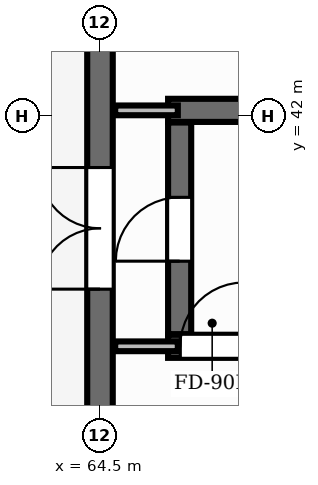
"""IFC4 building model, lengths in metres.
Left out: names, types, materials, properties, quantities, classifications, styles, units other than length and angle.
Written with IfcOpenShell. Run it as: python <this file> out.ifc"""

import sys

from ifc_helpers import new_model, si_unit, direction, frame, frame_2d, origin, place, context, subcontext, project, spatial, rectangle, extrude, element, fill, save


model = new_model("IFC4")
c1 = context("Model", 3, precision=1e-05, world=origin(), true_north=direction((0.0, 1.0)))
c2 = subcontext(c1, "Body", "Model", "MODEL_VIEW")
j1 = project(units=[si_unit("LENGTHUNIT", "METRE"), si_unit("PLANEANGLEUNIT", "RADIAN")], contexts=[c1])
p1 = place(None, origin())
s1 = spatial("IfcSite", under=j1, at=p1, CompositionType="ELEMENT")
p2 = place(p1, origin())
s2 = spatial("IfcBuilding", under=s1, at=p2, CompositionType="ELEMENT")
p3 = place(p2, origin())
s3 = spatial("IfcBuildingStorey", under=s2, at=p3, CompositionType="ELEMENT", Elevation=0.0)
p4 = place(p3, frame((64.5, 7.25, 0.0), z_axis=(0.0, 0.0, 1.0), x_axis=(0.0, 1.0, 0.0)))
e1 = element("IfcWall", 1, at=p4, inside=s3, PredefinedType="SHEAR", context=c2, shape_type="SweptSolid", body=[
    extrude(rectangle(XDim=39.5, YDim=0.42, at=frame_2d((19.75, 0.0))), origin(), (0.0, 0.0, 1.0), 5.1),
])
p5 = place(p4, frame((9.2, 0.0, 0.9)))
e2 = element("IfcOpeningElement", 2, at=p5, cuts=e1, PredefinedType="OPENING", context=c2, shape_type="SweptSolid", body=[
    extrude(rectangle(XDim=1.2, YDim=2.7, at=frame_2d((0.6, 1.35))), frame((0.0, 0.225, 0.0), z_axis=(0.0, -1.0, 0.0), x_axis=(1.0, 0.0, 0.0)), (0.0, 0.0, 1.0), 0.45),
])
p6 = place(p4, frame((12.6, 0.0, 0.9)))
e3 = element("IfcOpeningElement", 3, at=p6, cuts=e1, PredefinedType="OPENING", context=c2, shape_type="SweptSolid", body=[
    extrude(rectangle(XDim=1.2, YDim=2.7, at=frame_2d((0.6, 1.35))), frame((0.0, 0.225, 0.0), z_axis=(0.0, -1.0, 0.0), x_axis=(1.0, 0.0, 0.0)), (0.0, 0.0, 1.0), 0.45),
])
p7 = place(p4, frame((24.8, 0.0, 0.9)))
e4 = element("IfcOpeningElement", 4, at=p7, cuts=e1, PredefinedType="OPENING", context=c2, shape_type="SweptSolid", body=[
    extrude(rectangle(XDim=1.2, YDim=2.7, at=frame_2d((0.6, 1.35))), frame((0.0, 0.225, 0.0), z_axis=(0.0, -1.0, 0.0), x_axis=(1.0, 0.0, 0.0)), (0.0, 0.0, 1.0), 0.45),
])
p8 = place(p4, frame((36.2, 0.0, 0.9)))
e5 = element("IfcOpeningElement", 5, at=p8, cuts=e1, PredefinedType="OPENING", context=c2, shape_type="SweptSolid", body=[
    extrude(rectangle(XDim=1.2, YDim=2.7, at=frame_2d((0.6, 1.35))), frame((0.0, 0.225, 0.0), z_axis=(0.0, -1.0, 0.0), x_axis=(1.0, 0.0, 0.0)), (0.0, 0.0, 1.0), 0.45),
])
p9 = place(p4, frame((15.4, 0.0, 0.0)))
e6 = element("IfcOpeningElement", 6, at=p9, cuts=e1, PredefinedType="OPENING", context=c2, shape_type="SweptSolid", body=[
    extrude(rectangle(XDim=2.4, YDim=2.7, at=frame_2d((1.2, 1.35))), frame((0.0, 0.225, 0.0), z_axis=(0.0, -1.0, 0.0), x_axis=(1.0, 0.0, 0.0)), (0.0, 0.0, 1.0), 0.45),
])
p10 = place(p4, frame((21.6, 0.0, 0.0)))
e7 = element("IfcOpeningElement", 7, at=p10, cuts=e1, PredefinedType="OPENING", context=c2, shape_type="SweptSolid", body=[
    extrude(rectangle(XDim=2.4, YDim=2.7, at=frame_2d((1.2, 1.35))), frame((0.0, 0.225, 0.0), z_axis=(0.0, -1.0, 0.0), x_axis=(1.0, 0.0, 0.0)), (0.0, 0.0, 1.0), 0.45),
])
p11 = place(p4, frame((5.6, 0.0, 0.0)))
e8 = element("IfcOpeningElement", 8, at=p11, cuts=e1, PredefinedType="OPENING", context=c2, shape_type="SweptSolid", body=[
    extrude(rectangle(XDim=2.0, YDim=2.3, at=frame_2d((1.0, 1.15))), frame((0.0, 0.225, 0.0), z_axis=(0.0, -1.0, 0.0), x_axis=(1.0, 0.0, 0.0)), (0.0, 0.0, 1.0), 0.45),
])
p12 = place(p4, frame((31.9, 0.0, 0.0)))
e9 = element("IfcOpeningElement", 9, at=p12, cuts=e1, PredefinedType="OPENING", context=c2, shape_type="SweptSolid", body=[
    extrude(rectangle(XDim=2.0, YDim=2.3, at=frame_2d((1.0, 1.15))), frame((0.0, 0.225, 0.0), z_axis=(0.0, -1.0, 0.0), x_axis=(1.0, 0.0, 0.0)), (0.0, 0.0, 1.0), 0.45),
])
p13 = place(p3, frame((65.62, 38.21, 0.0), z_axis=(0.0, 0.0, 1.0), x_axis=(1.0, 0.0, 0.0)))
e10 = element("IfcWall", 10, at=p13, inside=s3, PredefinedType="SHEAR", context=c2, shape_type="SweptSolid", body=[
    extrude(rectangle(XDim=8.61, YDim=0.38, at=frame_2d((4.305, 0.0))), origin(), (0.0, 0.0, 1.0), 5.1),
])
p14 = place(p13, frame((0.2, 0.0, 0.0)))
e11 = element("IfcOpeningElement", 11, at=p14, cuts=e10, PredefinedType="OPENING", context=c2, shape_type="SweptSolid", body=[
    extrude(rectangle(XDim=1.05, YDim=2.15, at=frame_2d((0.525, 1.075))), frame((0.0, 0.205, 0.0), z_axis=(0.0, -1.0, 0.0), x_axis=(1.0, 0.0, 0.0)), (0.0, 0.0, 1.0), 0.41),
])
p15 = place(p3, frame((65.62, 42.09, 0.0), z_axis=(0.0, 0.0, 1.0), x_axis=(1.0, 0.0, 0.0)))
e12 = element("IfcWall", 12, at=p15, inside=s3, PredefinedType="SHEAR", context=c2, shape_type="SweptSolid", body=[
    extrude(rectangle(XDim=8.61, YDim=0.38, at=frame_2d((4.305, 0.0))), origin(), (0.0, 0.0, 1.0), 5.1),
])
p16 = place(p3, frame((65.81, 38.41, 0.0), z_axis=(0.0, 0.0, 1.0), x_axis=(0.0, 1.0, 0.0)))
e13 = element("IfcWall", 13, at=p16, inside=s3, PredefinedType="SHEAR", context=c2, shape_type="SweptSolid", body=[
    extrude(rectangle(XDim=3.48, YDim=0.38, at=frame_2d((1.74, 0.0))), origin(), (0.0, 0.0, 1.0), 5.1),
])
p17 = place(p16, frame((1.2, 0.0, 0.0)))
e14 = element("IfcOpeningElement", 14, at=p17, cuts=e13, PredefinedType="OPENING", context=c2, shape_type="SweptSolid", body=[
    extrude(rectangle(XDim=1.05, YDim=2.15, at=frame_2d((0.525, 1.075))), frame((0.0, 0.205, 0.0), z_axis=(0.0, -1.0, 0.0), x_axis=(1.0, 0.0, 0.0)), (0.0, 0.0, 1.0), 0.41),
])
for number, where, z_axis, x_axis in (
    (15, (64.75, 38.21, 0.0), (0.0, 0.0, 1.0), (1.0, 0.0, 0.0)),
    (16, (64.75, 42.09, 0.0), (0.0, 0.0, 1.0), (1.0, 0.0, 0.0)),
):
    element("IfcWall", number, at=place(p3, frame(where, z_axis=z_axis, x_axis=x_axis)), inside=s3, PredefinedType="PARTITIONING", context=c2, shape_type="SweptSolid", body=[
        extrude(rectangle(XDim=1.03, YDim=0.16, at=frame_2d((0.515, 0.0))), origin(), (0.0, 0.0, 1.0), 4.11),
    ])
p18 = place(p12, origin())
e17 = element("IfcDoor", 17, at=p18, inside=s3, OperationType="DOUBLE_DOOR_SINGLE_SWING", PredefinedType="DOOR", context=c2, shape_type="SweptSolid", body=[
    extrude(rectangle(XDim=2.0, YDim=2.3, at=frame_2d((1.0, 1.15))), frame((0.0, 0.025, 0.0), z_axis=(0.0, -1.0, 0.0), x_axis=(1.0, 0.0, 0.0)), (0.0, 0.0, 1.0), 0.05),
])
fill(e9, e17)
p19 = place(p14, origin())
e18 = element("IfcDoor", 18, at=p19, inside=s3, OperationType="SINGLE_SWING_RIGHT", PredefinedType="DOOR", context=c2, shape_type="SweptSolid", body=[
    extrude(rectangle(XDim=1.05, YDim=2.15, at=frame_2d((0.525, 1.075))), frame((0.0, 0.025, 0.0), z_axis=(0.0, -1.0, 0.0), x_axis=(1.0, 0.0, 0.0)), (0.0, 0.0, 1.0), 0.05),
])
fill(e11, e18)
p20 = place(p17, origin())
e19 = element("IfcDoor", 19, at=p20, inside=s3, OperationType="SINGLE_SWING_LEFT", PredefinedType="DOOR", context=c2, shape_type="SweptSolid", body=[
    extrude(rectangle(XDim=1.05, YDim=2.15, at=frame_2d((0.525, 1.075))), frame((0.0, 0.025, 0.0), z_axis=(0.0, -1.0, 0.0), x_axis=(1.0, 0.0, 0.0)), (0.0, 0.0, 1.0), 0.05),
])
fill(e14, e19)
save(model, sys.argv[1])
